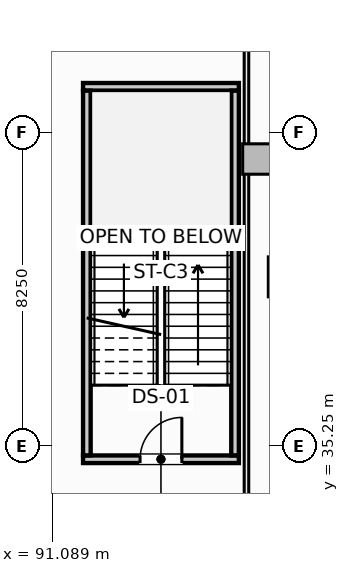
"""IFC4 building model, lengths in metres.
Left out: names, types, materials, properties, quantities, classifications, styles, units other than length and angle.
Written with IfcOpenShell. Run it as: python <this file> out.ifc"""

import sys

from ifc_helpers import new_model, si_unit, direction, frame, frame_2d, origin, origin_2d, place, context, subcontext, project, spatial, rectangle, extrude, element, fill, save


model = new_model("IFC4")
c1 = context("Model", 3, precision=1e-05, world=origin(), true_north=direction((0.0, 1.0)))
c2 = subcontext(c1, "Body", "Model", "MODEL_VIEW")
j1 = project(units=[si_unit("LENGTHUNIT", "METRE"), si_unit("PLANEANGLEUNIT", "RADIAN")], contexts=[c1])
p1 = place(None, origin())
s1 = spatial("IfcSite", under=j1, at=p1, CompositionType="ELEMENT")
p2 = place(p1, origin())
s2 = spatial("IfcBuilding", under=s1, at=p2, CompositionType="ELEMENT")
p3 = place(p2, frame((0.0, 0.0, -9.0)))
s3 = spatial("IfcBuildingStorey", under=s2, at=p3, CompositionType="ELEMENT", Elevation=-9.0)
p4 = place(p3, frame((97.3, 39.7, -0.32), z_axis=(0.0, 0.0, 1.0), x_axis=(1.0, 0.0, 0.0)))
e1 = element("IfcColumn", 1, at=p4, inside=s3, PredefinedType="COLUMN", context=c2, shape_type="SweptSolid", body=[
    extrude(rectangle(XDim=1.05, YDim=1.05, at=origin_2d()), origin(), (0.0, 0.0, 1.0), 4.5),
])
p5 = place(p3, frame((96.5, 42.8, -0.32), z_axis=(0.0, 0.0, 1.0), x_axis=(1.0, 0.0, 0.0)))
e2 = element("IfcColumn", 2, at=p5, inside=s3, PredefinedType="PILASTER", context=c2, shape_type="SweptSolid", body=[
    extrude(rectangle(XDim=0.8, YDim=0.8, at=origin_2d()), origin(), (0.0, 0.0, 1.0), 4.5),
])
p6 = place(p3, frame((91.9, 34.9, -0.32), z_axis=(0.0, 0.0, 1.0), x_axis=(1.0, 0.0, 0.0)))
e3 = element("IfcWall", 3, at=p6, inside=s3, PredefinedType="SHEAR", context=c2, shape_type="SweptSolid", body=[
    extrude(rectangle(XDim=4.1, YDim=0.2, at=frame_2d((2.05, 0.0))), origin(), (0.0, 0.0, 1.0), 4.5),
])
p7 = place(p6, frame((1.5, 0.0, 0.32)))
e4 = element("IfcOpeningElement", 4, at=p7, cuts=e3, PredefinedType="OPENING", context=c2, shape_type="SweptSolid", body=[
    extrude(rectangle(XDim=1.1, YDim=2.15, at=frame_2d((0.55, 1.075))), frame((0.0, 0.11, 0.0), z_axis=(0.0, -1.0, 0.0), x_axis=(1.0, 0.0, 0.0)), (0.0, 0.0, 1.0), 0.22),
])
p8 = place(p3, frame((91.9, 44.7, -0.32), z_axis=(0.0, 0.0, 1.0), x_axis=(1.0, 0.0, 0.0)))
e5 = element("IfcWall", 5, at=p8, inside=s3, PredefinedType="SHEAR", context=c2, shape_type="SweptSolid", body=[
    extrude(rectangle(XDim=4.1, YDim=0.2, at=frame_2d((2.05, 0.0))), origin(), (0.0, 0.0, 1.0), 4.5),
])
for number, where, z_axis, x_axis in (
    (6, (92.0, 35.002, -0.32), (0.0, 0.0, 1.0), (0.0, 1.0, 0.0)),
    (7, (95.9, 35.002, -0.32), (0.0, 0.0, 1.0), (0.0, 1.0, 0.0)),
):
    element("IfcWall", number, at=place(p3, frame(where, z_axis=z_axis, x_axis=x_axis)), inside=s3, PredefinedType="SHEAR", context=c2, shape_type="SweptSolid", body=[
        extrude(rectangle(XDim=9.596, YDim=0.2, at=frame_2d((4.798, 0.0))), origin(), (0.0, 0.0, 1.0), 4.5),
    ])
p9 = place(p3, frame((96.2, 6.612, 0.0), z_axis=(0.0, 0.0, 1.0), x_axis=(0.0, 1.0, 0.0)))
e8 = element("IfcWall", 8, at=p9, inside=s3, PredefinedType="PARTITIONING", context=c2, shape_type="SweptSolid", body=[
    extrude(rectangle(XDim=39.976, YDim=0.12, at=frame_2d((19.988, 0.0))), origin(), (0.0, 0.0, 1.0), 4.18),
])
p10 = place(p7, origin())
e9 = element("IfcDoor", 9, at=p10, inside=s3, OperationType="SINGLE_SWING_RIGHT", PredefinedType="DOOR", context=c2, shape_type="SweptSolid", body=[
    extrude(rectangle(XDim=1.1, YDim=2.15, at=frame_2d((0.55, 1.075))), frame((0.0, 0.025, 0.0), z_axis=(0.0, -1.0, 0.0), x_axis=(1.0, 0.0, 0.0)), (0.0, 0.0, 1.0), 0.05),
])
fill(e4, e9)
save(model, sys.argv[1])
